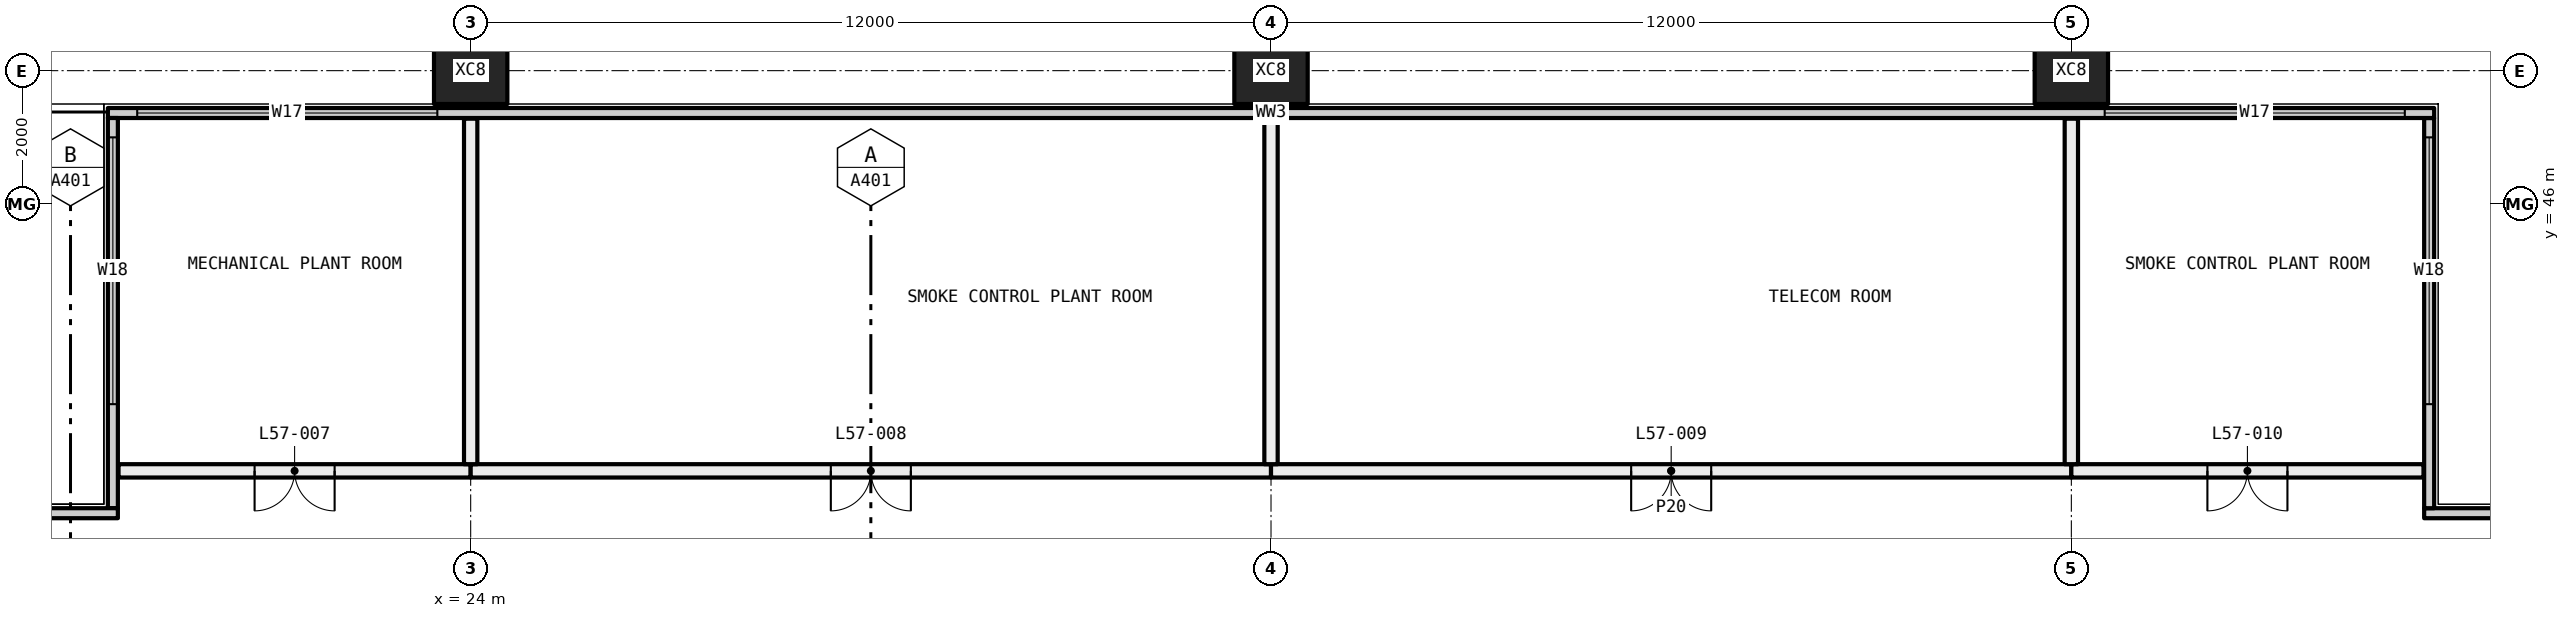
"""IFC4 building model, lengths in metres.
Left out: names, types, materials, properties, quantities, classifications, styles, units other than length and angle.
Written with IfcOpenShell. Run it as: python <this file> out.ifc"""

import sys

from ifc_helpers import new_model, si_unit, direction, frame, frame_2d, origin, origin_2d, place, context, subcontext, project, spatial, rectangle, hollow_rectangle, extrude, element, fill, save


model = new_model("IFC4")
c1 = context("Model", 3, precision=1e-05, world=origin(), true_north=direction((0.0, 1.0)))
c2 = subcontext(c1, "Body", "Model", "MODEL_VIEW")
j1 = project(units=[si_unit("LENGTHUNIT", "METRE"), si_unit("PLANEANGLEUNIT", "RADIAN")], contexts=[c1])
p1 = place(None, origin())
s1 = spatial("IfcSite", under=j1, at=p1, CompositionType="ELEMENT")
p2 = place(p1, origin())
s2 = spatial("IfcBuilding", under=s1, at=p2, CompositionType="ELEMENT")
p3 = place(p2, frame((0.0, 0.0, 213.45)))
s3 = spatial("IfcBuildingStorey", under=s2, at=p3, CompositionType="ELEMENT", Elevation=213.45)
for number, where, z_axis, x_axis in (
    (1, (24.0, 48.0, -0.4), (0.0, 0.0, 1.0), (1.0, 0.0, 0.0)),
    (2, (36.0, 48.0, -0.4), (0.0, 0.0, 1.0), (1.0, 0.0, 0.0)),
    (3, (48.0, 48.0, -0.4), (0.0, 0.0, 1.0), (1.0, 0.0, 0.0)),
):
    element("IfcColumn", number, at=place(p3, frame(where, z_axis=z_axis, x_axis=x_axis)), inside=s3, PredefinedType="COLUMN", context=c2, shape_type="SweptSolid", body=[
        extrude(hollow_rectangle(XDim=1.1, YDim=1.0, WallThickness=0.04, at=origin_2d()), origin(), (0.0, 0.0, 1.0), 4.5),
    ])
p4 = place(p3, frame((53.29, 41.365, 0.0), z_axis=(0.0, 0.0, 1.0), x_axis=(1.0, 0.0, 0.0)))
e4 = element("IfcWall", 4, at=p4, inside=s3, PredefinedType="ELEMENTEDWALL", context=c2, shape_type="SweptSolid", body=[
    extrude(rectangle(XDim=6.15, YDim=0.15, at=frame_2d((3.075, 0.0))), origin(), (0.0, 0.0, 1.0), 4.1),
])
p5 = place(p4, frame((1.71, 0.0, 0.45)))
e5 = element("IfcOpeningElement", 5, at=p5, cuts=e4, PredefinedType="OPENING", context=c2, shape_type="SweptSolid", body=[
    extrude(rectangle(XDim=4.0, YDim=3.6, at=frame_2d((2.0, 1.8))), frame((0.0, 0.085, 0.0), z_axis=(0.0, -1.0, 0.0), x_axis=(1.0, 0.0, 0.0)), (0.0, 0.0, 1.0), 0.17),
])
p6 = place(p3, frame((53.365, 41.44, 0.0), z_axis=(0.0, 0.0, 1.0), x_axis=(0.0, 1.0, 0.0)))
e6 = element("IfcWall", 6, at=p6, inside=s3, PredefinedType="ELEMENTEDWALL", context=c2, shape_type="SweptSolid", body=[
    extrude(rectangle(XDim=5.85, YDim=0.15, at=frame_2d((2.925, 0.0))), origin(), (0.0, 0.0, 1.0), 4.1),
])
p7 = place(p6, frame((1.56, 0.0, 0.45)))
e7 = element("IfcOpeningElement", 7, at=p7, cuts=e6, PredefinedType="OPENING", context=c2, shape_type="SweptSolid", body=[
    extrude(rectangle(XDim=4.0, YDim=3.6, at=frame_2d((2.0, 1.8))), frame((0.0, 0.085, 0.0), z_axis=(0.0, -1.0, 0.0), x_axis=(1.0, 0.0, 0.0)), (0.0, 0.0, 1.0), 0.17),
])
p8 = place(p3, frame((18.56, 47.365, 0.0), z_axis=(0.0, 0.0, 1.0), x_axis=(1.0, 0.0, 0.0)))
e8 = element("IfcWall", 8, at=p8, inside=s3, PredefinedType="ELEMENTEDWALL", context=c2, shape_type="SweptSolid", body=[
    extrude(rectangle(XDim=34.88, YDim=0.15, at=frame_2d((17.44, 0.0))), origin(), (0.0, 0.0, 1.0), 4.1),
])
p9 = place(p8, frame((0.44, 0.0, 0.45)))
e9 = element("IfcOpeningElement", 9, at=p9, cuts=e8, PredefinedType="OPENING", context=c2, shape_type="SweptSolid", body=[
    extrude(rectangle(XDim=4.5, YDim=3.6, at=frame_2d((2.25, 1.8))), frame((0.0, 0.085, 0.0), z_axis=(0.0, -1.0, 0.0), x_axis=(1.0, 0.0, 0.0)), (0.0, 0.0, 1.0), 0.17),
])
p10 = place(p8, frame((29.94, 0.0, 0.45)))
e10 = element("IfcOpeningElement", 10, at=p10, cuts=e8, PredefinedType="OPENING", context=c2, shape_type="SweptSolid", body=[
    extrude(rectangle(XDim=4.5, YDim=3.6, at=frame_2d((2.25, 1.8))), frame((0.0, 0.085, 0.0), z_axis=(0.0, -1.0, 0.0), x_axis=(1.0, 0.0, 0.0)), (0.0, 0.0, 1.0), 0.17),
])
p11 = place(p3, frame((18.635, 41.44, 0.0), z_axis=(0.0, 0.0, 1.0), x_axis=(0.0, 1.0, 0.0)))
e11 = element("IfcWall", 11, at=p11, inside=s3, PredefinedType="ELEMENTEDWALL", context=c2, shape_type="SweptSolid", body=[
    extrude(rectangle(XDim=5.85, YDim=0.15, at=frame_2d((2.925, 0.0))), origin(), (0.0, 0.0, 1.0), 4.1),
])
p12 = place(p11, frame((1.56, 0.0, 0.45)))
e12 = element("IfcOpeningElement", 12, at=p12, cuts=e11, PredefinedType="OPENING", context=c2, shape_type="SweptSolid", body=[
    extrude(rectangle(XDim=4.0, YDim=3.6, at=frame_2d((2.0, 1.8))), frame((0.0, 0.085, 0.0), z_axis=(0.0, -1.0, 0.0), x_axis=(1.0, 0.0, 0.0)), (0.0, 0.0, 1.0), 0.17),
])
p13 = place(p3, frame((12.56, 41.365, 0.0), z_axis=(0.0, 0.0, 1.0), x_axis=(1.0, 0.0, 0.0)))
e13 = element("IfcWall", 13, at=p13, inside=s3, PredefinedType="ELEMENTEDWALL", context=c2, shape_type="SweptSolid", body=[
    extrude(rectangle(XDim=6.15, YDim=0.15, at=frame_2d((3.075, 0.0))), origin(), (0.0, 0.0, 1.0), 4.1),
])
p14 = place(p13, frame((0.44, 0.0, 0.45)))
e14 = element("IfcOpeningElement", 14, at=p14, cuts=e13, PredefinedType="OPENING", context=c2, shape_type="SweptSolid", body=[
    extrude(rectangle(XDim=4.0, YDim=3.6, at=frame_2d((2.0, 1.8))), frame((0.0, 0.085, 0.0), z_axis=(0.0, -1.0, 0.0), x_axis=(1.0, 0.0, 0.0)), (0.0, 0.0, 1.0), 0.17),
])
p15 = place(p3, frame((24.0, 42.0, 0.0), z_axis=(0.0, 0.0, 1.0), x_axis=(-1.0, 0.0, 0.0)))
e15 = element("IfcWall", 15, at=p15, inside=s3, PredefinedType="PARTITIONING", context=c2, shape_type="SweptSolid", body=[
    extrude(rectangle(XDim=5.28, YDim=0.2, at=frame_2d((2.64, 0.0))), origin(), (0.0, 0.0, 1.0), 4.1),
])
p16 = place(p15, frame((2.04, 0.0, 0.0)))
e16 = element("IfcOpeningElement", 16, at=p16, cuts=e15, PredefinedType="OPENING", context=c2, shape_type="SweptSolid", body=[
    extrude(rectangle(XDim=1.2, YDim=2.1, at=frame_2d((0.6, 1.05))), frame((0.0, 0.11, 0.0), z_axis=(0.0, -1.0, 0.0), x_axis=(1.0, 0.0, 0.0)), (0.0, 0.0, 1.0), 0.22),
])
p17 = place(p3, frame((36.0, 42.0, 0.0), z_axis=(0.0, 0.0, 1.0), x_axis=(-1.0, 0.0, 0.0)))
e17 = element("IfcWall", 17, at=p17, inside=s3, PredefinedType="PARTITIONING", context=c2, shape_type="SweptSolid", body=[
    extrude(rectangle(XDim=12.0, YDim=0.2, at=frame_2d((6.0, 0.0))), origin(), (0.0, 0.0, 1.0), 3.5),
])
p18 = place(p17, frame((5.4, 0.0, 0.0)))
e18 = element("IfcOpeningElement", 18, at=p18, cuts=e17, PredefinedType="OPENING", context=c2, shape_type="SweptSolid", body=[
    extrude(rectangle(XDim=1.2, YDim=2.1, at=frame_2d((0.6, 1.05))), frame((0.0, 0.11, 0.0), z_axis=(0.0, -1.0, 0.0), x_axis=(1.0, 0.0, 0.0)), (0.0, 0.0, 1.0), 0.22),
])
p19 = place(p3, frame((48.0, 42.0, 0.0), z_axis=(0.0, 0.0, 1.0), x_axis=(-1.0, 0.0, 0.0)))
e19 = element("IfcWall", 19, at=p19, inside=s3, PredefinedType="PARTITIONING", context=c2, shape_type="SweptSolid", body=[
    extrude(rectangle(XDim=12.0, YDim=0.2, at=frame_2d((6.0, 0.0))), origin(), (0.0, 0.0, 1.0), 3.5),
])
p20 = place(p19, frame((5.4, 0.0, 0.0)))
e20 = element("IfcOpeningElement", 20, at=p20, cuts=e19, PredefinedType="OPENING", context=c2, shape_type="SweptSolid", body=[
    extrude(rectangle(XDim=1.2, YDim=2.1, at=frame_2d((0.6, 1.05))), frame((0.0, 0.11, 0.0), z_axis=(0.0, -1.0, 0.0), x_axis=(1.0, 0.0, 0.0)), (0.0, 0.0, 1.0), 0.22),
])
p21 = place(p3, frame((53.28, 42.0, 0.0), z_axis=(0.0, 0.0, 1.0), x_axis=(-1.0, 0.0, 0.0)))
e21 = element("IfcWall", 21, at=p21, inside=s3, PredefinedType="PARTITIONING", context=c2, shape_type="SweptSolid", body=[
    extrude(rectangle(XDim=5.28, YDim=0.2, at=frame_2d((2.64, 0.0))), origin(), (0.0, 0.0, 1.0), 4.1),
])
p22 = place(p21, frame((2.04, 0.0, 0.0)))
e22 = element("IfcOpeningElement", 22, at=p22, cuts=e21, PredefinedType="OPENING", context=c2, shape_type="SweptSolid", body=[
    extrude(rectangle(XDim=1.2, YDim=2.1, at=frame_2d((0.6, 1.05))), frame((0.0, 0.11, 0.0), z_axis=(0.0, -1.0, 0.0), x_axis=(1.0, 0.0, 0.0)), (0.0, 0.0, 1.0), 0.22),
])
p23 = place(p3, frame((24.0, 42.1, 0.0), z_axis=(0.0, 0.0, 1.0), x_axis=(0.0, 1.0, 0.0)))
e23 = element("IfcWall", 23, at=p23, inside=s3, PredefinedType="PARTITIONING", context=c2, shape_type="SweptSolid", body=[
    extrude(rectangle(XDim=5.18, YDim=0.2, at=frame_2d((2.59, 0.0))), origin(), (0.0, 0.0, 1.0), 4.1),
])
p24 = place(p3, frame((36.0, 42.1, 0.0), z_axis=(0.0, 0.0, 1.0), x_axis=(0.0, 1.0, 0.0)))
e24 = element("IfcWall", 24, at=p24, inside=s3, PredefinedType="PARTITIONING", context=c2, shape_type="SweptSolid", body=[
    extrude(rectangle(XDim=5.18, YDim=0.2, at=frame_2d((2.59, 0.0))), origin(), (0.0, 0.0, 1.0), 3.5),
])
p25 = place(p3, frame((48.0, 42.1, 0.0), z_axis=(0.0, 0.0, 1.0), x_axis=(0.0, 1.0, 0.0)))
e25 = element("IfcWall", 25, at=p25, inside=s3, PredefinedType="PARTITIONING", context=c2, shape_type="SweptSolid", body=[
    extrude(rectangle(XDim=5.18, YDim=0.2, at=frame_2d((2.59, 0.0))), origin(), (0.0, 0.0, 1.0), 4.1),
])
p26 = place(p7, origin())
e26 = element("IfcWindow", 26, at=p26, inside=s3, PartitioningType="SINGLE_PANEL", PredefinedType="WINDOW", context=c2, shape_type="SweptSolid", body=[
    extrude(rectangle(XDim=4.0, YDim=3.6, at=frame_2d((2.0, 1.8))), frame((0.0, 0.03, 0.0), z_axis=(0.0, -1.0, 0.0), x_axis=(1.0, 0.0, 0.0)), (0.0, 0.0, 1.0), 0.06),
])
fill(e7, e26)
p27 = place(p9, origin())
e27 = element("IfcWindow", 27, at=p27, inside=s3, PartitioningType="SINGLE_PANEL", PredefinedType="WINDOW", context=c2, shape_type="SweptSolid", body=[
    extrude(rectangle(XDim=4.5, YDim=3.6, at=frame_2d((2.25, 1.8))), frame((0.0, 0.03, 0.0), z_axis=(0.0, -1.0, 0.0), x_axis=(1.0, 0.0, 0.0)), (0.0, 0.0, 1.0), 0.06),
])
fill(e9, e27)
p28 = place(p10, origin())
e28 = element("IfcWindow", 28, at=p28, inside=s3, PartitioningType="SINGLE_PANEL", PredefinedType="WINDOW", context=c2, shape_type="SweptSolid", body=[
    extrude(rectangle(XDim=4.5, YDim=3.6, at=frame_2d((2.25, 1.8))), frame((0.0, 0.03, 0.0), z_axis=(0.0, -1.0, 0.0), x_axis=(1.0, 0.0, 0.0)), (0.0, 0.0, 1.0), 0.06),
])
fill(e10, e28)
p29 = place(p12, origin())
e29 = element("IfcWindow", 29, at=p29, inside=s3, PartitioningType="SINGLE_PANEL", PredefinedType="WINDOW", context=c2, shape_type="SweptSolid", body=[
    extrude(rectangle(XDim=4.0, YDim=3.6, at=frame_2d((2.0, 1.8))), frame((0.0, 0.03, 0.0), z_axis=(0.0, -1.0, 0.0), x_axis=(1.0, 0.0, 0.0)), (0.0, 0.0, 1.0), 0.06),
])
fill(e12, e29)
p30 = place(p16, origin())
e30 = element("IfcDoor", 30, at=p30, inside=s3, OperationType="DOUBLE_DOOR_SINGLE_SWING", PredefinedType="DOOR", context=c2, shape_type="SweptSolid", body=[
    extrude(rectangle(XDim=1.2, YDim=2.1, at=frame_2d((0.6, 1.05))), frame((0.0, 0.025, 0.0), z_axis=(0.0, -1.0, 0.0), x_axis=(1.0, 0.0, 0.0)), (0.0, 0.0, 1.0), 0.05),
])
fill(e16, e30)
p31 = place(p18, origin())
e31 = element("IfcDoor", 31, at=p31, inside=s3, OperationType="DOUBLE_DOOR_SINGLE_SWING", PredefinedType="DOOR", context=c2, shape_type="SweptSolid", body=[
    extrude(rectangle(XDim=1.2, YDim=2.1, at=frame_2d((0.6, 1.05))), frame((0.0, 0.025, 0.0), z_axis=(0.0, -1.0, 0.0), x_axis=(1.0, 0.0, 0.0)), (0.0, 0.0, 1.0), 0.05),
])
fill(e18, e31)
p32 = place(p20, origin())
e32 = element("IfcDoor", 32, at=p32, inside=s3, OperationType="DOUBLE_DOOR_SINGLE_SWING", PredefinedType="DOOR", context=c2, shape_type="SweptSolid", body=[
    extrude(rectangle(XDim=1.2, YDim=2.1, at=frame_2d((0.6, 1.05))), frame((0.0, 0.025, 0.0), z_axis=(0.0, -1.0, 0.0), x_axis=(1.0, 0.0, 0.0)), (0.0, 0.0, 1.0), 0.05),
])
fill(e20, e32)
p33 = place(p22, origin())
e33 = element("IfcDoor", 33, at=p33, inside=s3, OperationType="DOUBLE_DOOR_SINGLE_SWING", PredefinedType="DOOR", context=c2, shape_type="SweptSolid", body=[
    extrude(rectangle(XDim=1.2, YDim=2.1, at=frame_2d((0.6, 1.05))), frame((0.0, 0.025, 0.0), z_axis=(0.0, -1.0, 0.0), x_axis=(1.0, 0.0, 0.0)), (0.0, 0.0, 1.0), 0.05),
])
fill(e22, e33)
save(model, sys.argv[1])
